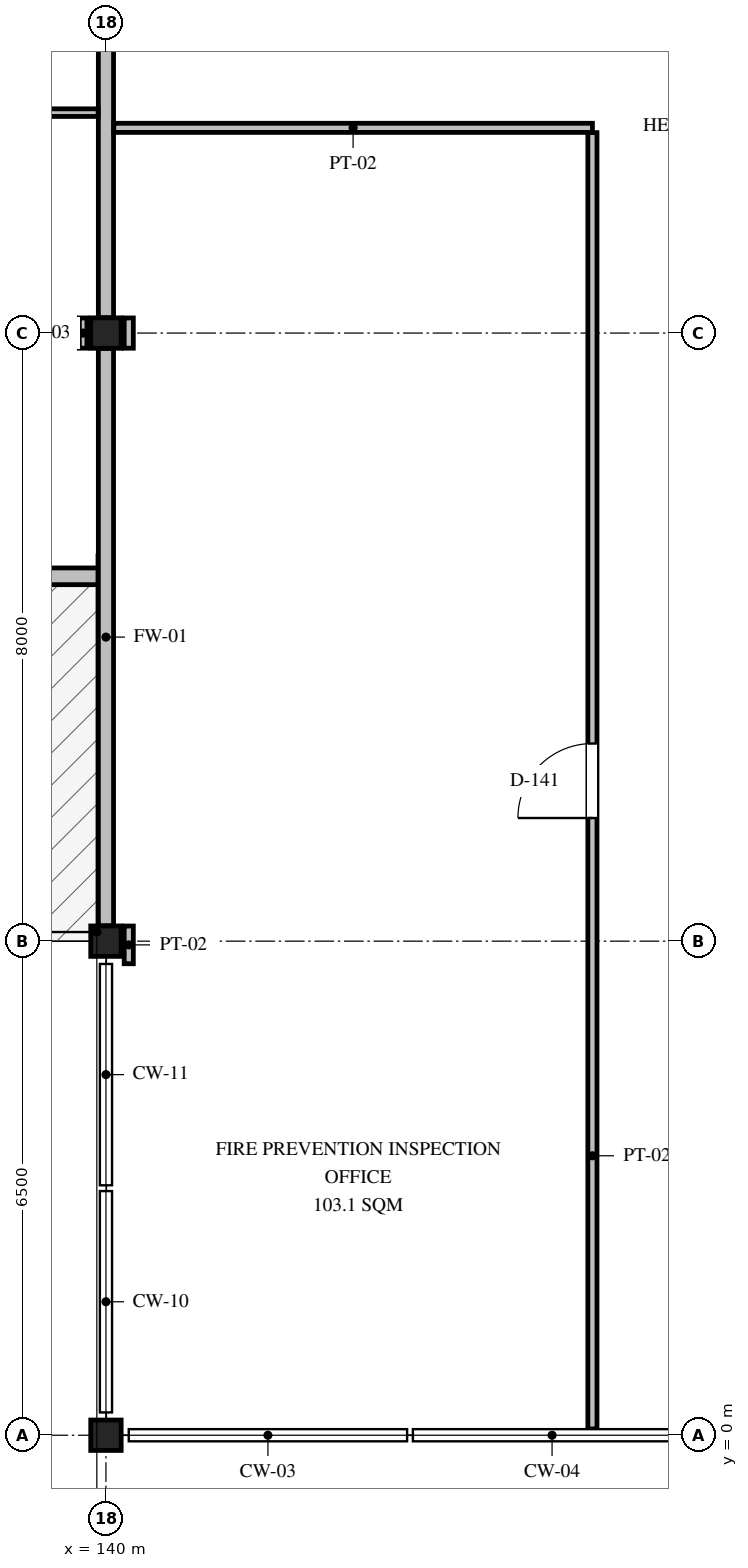
"""IFC4 building model, lengths in metres.
Left out: names, types, materials, properties, quantities, classifications, styles, units other than length and angle.
Written with IfcOpenShell. Run it as: python <this file> out.ifc"""

import sys

from ifc_helpers import new_model, si_unit, direction, frame, frame_2d, origin, origin_2d, place, context, subcontext, project, spatial, rectangle, i_section, extrude, element, fill, save


model = new_model("IFC4")
c1 = context("Model", 3, precision=1e-05, world=origin(), true_north=direction((0.0, 1.0)))
c2 = subcontext(c1, "Body", "Model", "MODEL_VIEW")
j1 = project(units=[si_unit("LENGTHUNIT", "METRE"), si_unit("PLANEANGLEUNIT", "RADIAN")], contexts=[c1])
p1 = place(None, origin())
s1 = spatial("IfcSite", under=j1, at=p1, CompositionType="ELEMENT")
p2 = place(p1, origin())
s2 = spatial("IfcBuilding", under=s1, at=p2, CompositionType="ELEMENT")
p3 = place(p2, frame((0.0, 0.0, 5.85)))
s3 = spatial("IfcBuildingStorey", under=s2, at=p3, CompositionType="ELEMENT", Elevation=5.85)
for number, where, z_axis, x_axis in (
    (1, (140.0, 0.0, 0.0), (0.0, 0.0, 1.0), (1.0, 0.0, 0.0)),
    (2, (140.0, 6.5, 0.0), (0.0, 0.0, 1.0), (1.0, 0.0, 0.0)),
    (3, (140.0, 14.5, 0.0), (0.0, 0.0, 1.0), (1.0, 0.0, 0.0)),
):
    element("IfcColumn", number, at=place(p3, frame(where, z_axis=z_axis, x_axis=x_axis)), inside=s3, PredefinedType="COLUMN", context=c2, shape_type="SweptSolid", body=[
        extrude(i_section(OverallWidth=0.4, OverallDepth=0.4, WebThickness=0.013, FlangeThickness=0.021, FilletRadius=0.022, at=origin_2d()), origin(), (0.0, 0.0, 1.0), 4.2),
    ])
p4 = place(p3, frame((133.15, 11.3, 0.0), z_axis=(0.0, 0.0, 1.0), x_axis=(1.0, 0.0, 0.0)))
e4 = element("IfcWall", 4, at=p4, inside=s3, PredefinedType="SOLIDWALL", context=c2, shape_type="SweptSolid", body=[
    extrude(rectangle(XDim=6.75, YDim=0.22, at=frame_2d((3.375, 0.0))), origin(), (0.0, 0.0, 1.0), 3.96),
])
p5 = place(p4, frame((2.6, 0.0, 0.0)))
e5 = element("IfcOpeningElement", 5, at=p5, cuts=e4, PredefinedType="OPENING", context=c2, shape_type="SweptSolid", body=[
    extrude(rectangle(XDim=1.1, YDim=2.2, at=frame_2d((0.55, 1.1))), frame((0.0, 0.12, 0.0), z_axis=(0.0, -1.0, 0.0), x_axis=(1.0, 0.0, 0.0)), (0.0, 0.0, 1.0), 0.24),
])
p6 = place(p4, frame((4.55, 0.0, 1.35)))
e6 = element("IfcOpeningElement", 6, at=p6, cuts=e4, PredefinedType="OPENING", context=c2, shape_type="SweptSolid", body=[
    extrude(rectangle(XDim=0.95, YDim=1.65, at=frame_2d((0.475, 0.825))), frame((0.0, 0.12, 0.0), z_axis=(0.0, -1.0, 0.0), x_axis=(1.0, 0.0, 0.0)), (0.0, 0.0, 1.0), 0.24),
])
p7 = place(p3, frame((140.0, 6.702, 0.0), z_axis=(0.0, 0.0, 1.0), x_axis=(0.0, 1.0, 0.0)))
e7 = element("IfcWall", 7, at=p7, inside=s3, PredefinedType="PARTITIONING", context=c2, shape_type="SweptSolid", body=[
    extrude(rectangle(XDim=7.596, YDim=0.2, at=frame_2d((3.798, 0.0))), origin(), (0.0, 0.0, 1.0), 3.366),
])
p8 = place(p3, frame((140.0, 14.702, 0.0), z_axis=(0.0, 0.0, 1.0), x_axis=(0.0, 1.0, 0.0)))
e8 = element("IfcWall", 8, at=p8, inside=s3, PredefinedType="PARTITIONING", context=c2, shape_type="SweptSolid", body=[
    extrude(rectangle(XDim=7.596, YDim=0.2, at=frame_2d((3.798, 0.0))), origin(), (0.0, 0.0, 1.0), 3.304),
])
p9 = place(p8, frame((3.598, 0.0, 0.0)))
e9 = element("IfcOpeningElement", 9, at=p9, cuts=e8, PredefinedType="OPENING", context=c2, shape_type="SweptSolid", body=[
    extrude(rectangle(XDim=1.2, YDim=2.15, at=frame_2d((0.6, 1.075))), frame((0.0, 0.11, 0.0), z_axis=(0.0, -1.0, 0.0), x_axis=(1.0, 0.0, 0.0)), (0.0, 0.0, 1.0), 0.22),
])
p10 = place(p3, frame((131.753, 17.4, 0.0), z_axis=(0.0, 0.0, 1.0), x_axis=(1.0, 0.0, 0.0)))
e10 = element("IfcWall", 10, at=p10, inside=s3, PredefinedType="PARTITIONING", context=c2, shape_type="SweptSolid", body=[
    extrude(rectangle(XDim=8.144, YDim=0.1, at=frame_2d((4.072, 0.0))), origin(), (0.0, 0.0, 1.0), 3.96),
])
p11 = place(p10, frame((3.572, 0.0, 0.0)))
e11 = element("IfcOpeningElement", 11, at=p11, cuts=e10, PredefinedType="OPENING", context=c2, shape_type="SweptSolid", body=[
    extrude(rectangle(XDim=1.0, YDim=2.1, at=frame_2d((0.5, 1.05))), frame((0.0, 0.06, 0.0), z_axis=(0.0, -1.0, 0.0), x_axis=(1.0, 0.0, 0.0)), (0.0, 0.0, 1.0), 0.12),
])
p12 = place(p3, frame((139.7, 14.301, 0.0), z_axis=(0.0, 0.0, 1.0), x_axis=(0.0, 1.0, 0.0)))
e12 = element("IfcWall", 12, at=p12, inside=s3, PredefinedType="PARTITIONING", context=c2, shape_type="SweptSolid", body=[
    extrude(rectangle(XDim=0.398, YDim=0.1, at=frame_2d((0.199, 0.0))), origin(), (0.0, 0.0, 1.0), 3.96),
])
p13 = place(p3, frame((140.103, 17.2, 0.0), z_axis=(0.0, 0.0, 1.0), x_axis=(1.0, 0.0, 0.0)))
e13 = element("IfcWall", 13, at=p13, inside=s3, PredefinedType="PARTITIONING", context=c2, shape_type="SweptSolid", body=[
    extrude(rectangle(XDim=6.297, YDim=0.12, at=frame_2d((3.148, 0.0))), origin(), (0.0, 0.0, 1.0), 3.96),
])
p14 = place(p3, frame((140.3, 6.203, 0.0), z_axis=(0.0, 0.0, 1.0), x_axis=(0.0, 1.0, 0.0)))
e14 = element("IfcWall", 14, at=p14, inside=s3, PredefinedType="PARTITIONING", context=c2, shape_type="SweptSolid", body=[
    extrude(rectangle(XDim=0.496, YDim=0.12, at=frame_2d((0.248, 0.0))), origin(), (0.0, 0.0, 1.0), 3.96),
])
p15 = place(p3, frame((140.3, 14.301, 0.0), z_axis=(0.0, 0.0, 1.0), x_axis=(0.0, 1.0, 0.0)))
e15 = element("IfcWall", 15, at=p15, inside=s3, PredefinedType="PARTITIONING", context=c2, shape_type="SweptSolid", body=[
    extrude(rectangle(XDim=0.398, YDim=0.12, at=frame_2d((0.199, 0.0))), origin(), (0.0, 0.0, 1.0), 3.96),
])
p16 = place(p3, frame((146.4, 0.083, 0.0), z_axis=(0.0, 0.0, 1.0), x_axis=(0.0, 1.0, 0.0)))
e16 = element("IfcWall", 16, at=p16, inside=s3, PredefinedType="PARTITIONING", context=c2, shape_type="SweptSolid", body=[
    extrude(rectangle(XDim=17.054, YDim=0.12, at=frame_2d((8.527, 0.0))), origin(), (0.0, 0.0, 1.0), 3.654),
])
p17 = place(p16, frame((8.037, 0.0, 0.0)))
e17 = element("IfcOpeningElement", 17, at=p17, cuts=e16, PredefinedType="OPENING", context=c2, shape_type="SweptSolid", body=[
    extrude(rectangle(XDim=0.98, YDim=2.1, at=frame_2d((0.49, 1.05))), frame((0.0, 0.07, 0.0), z_axis=(0.0, -1.0, 0.0), x_axis=(1.0, 0.0, 0.0)), (0.0, 0.0, 1.0), 0.14),
])
p18 = place(p17, origin())
e18 = element("IfcDoor", 18, at=p18, inside=s3, OperationType="SINGLE_SWING_LEFT", PredefinedType="DOOR", context=c2, shape_type="SweptSolid", body=[
    extrude(rectangle(XDim=0.98, YDim=2.1, at=frame_2d((0.49, 1.05))), frame((0.0, 0.025, 0.0), z_axis=(0.0, -1.0, 0.0), x_axis=(1.0, 0.0, 0.0)), (0.0, 0.0, 1.0), 0.05),
])
fill(e17, e18)
save(model, sys.argv[1])
